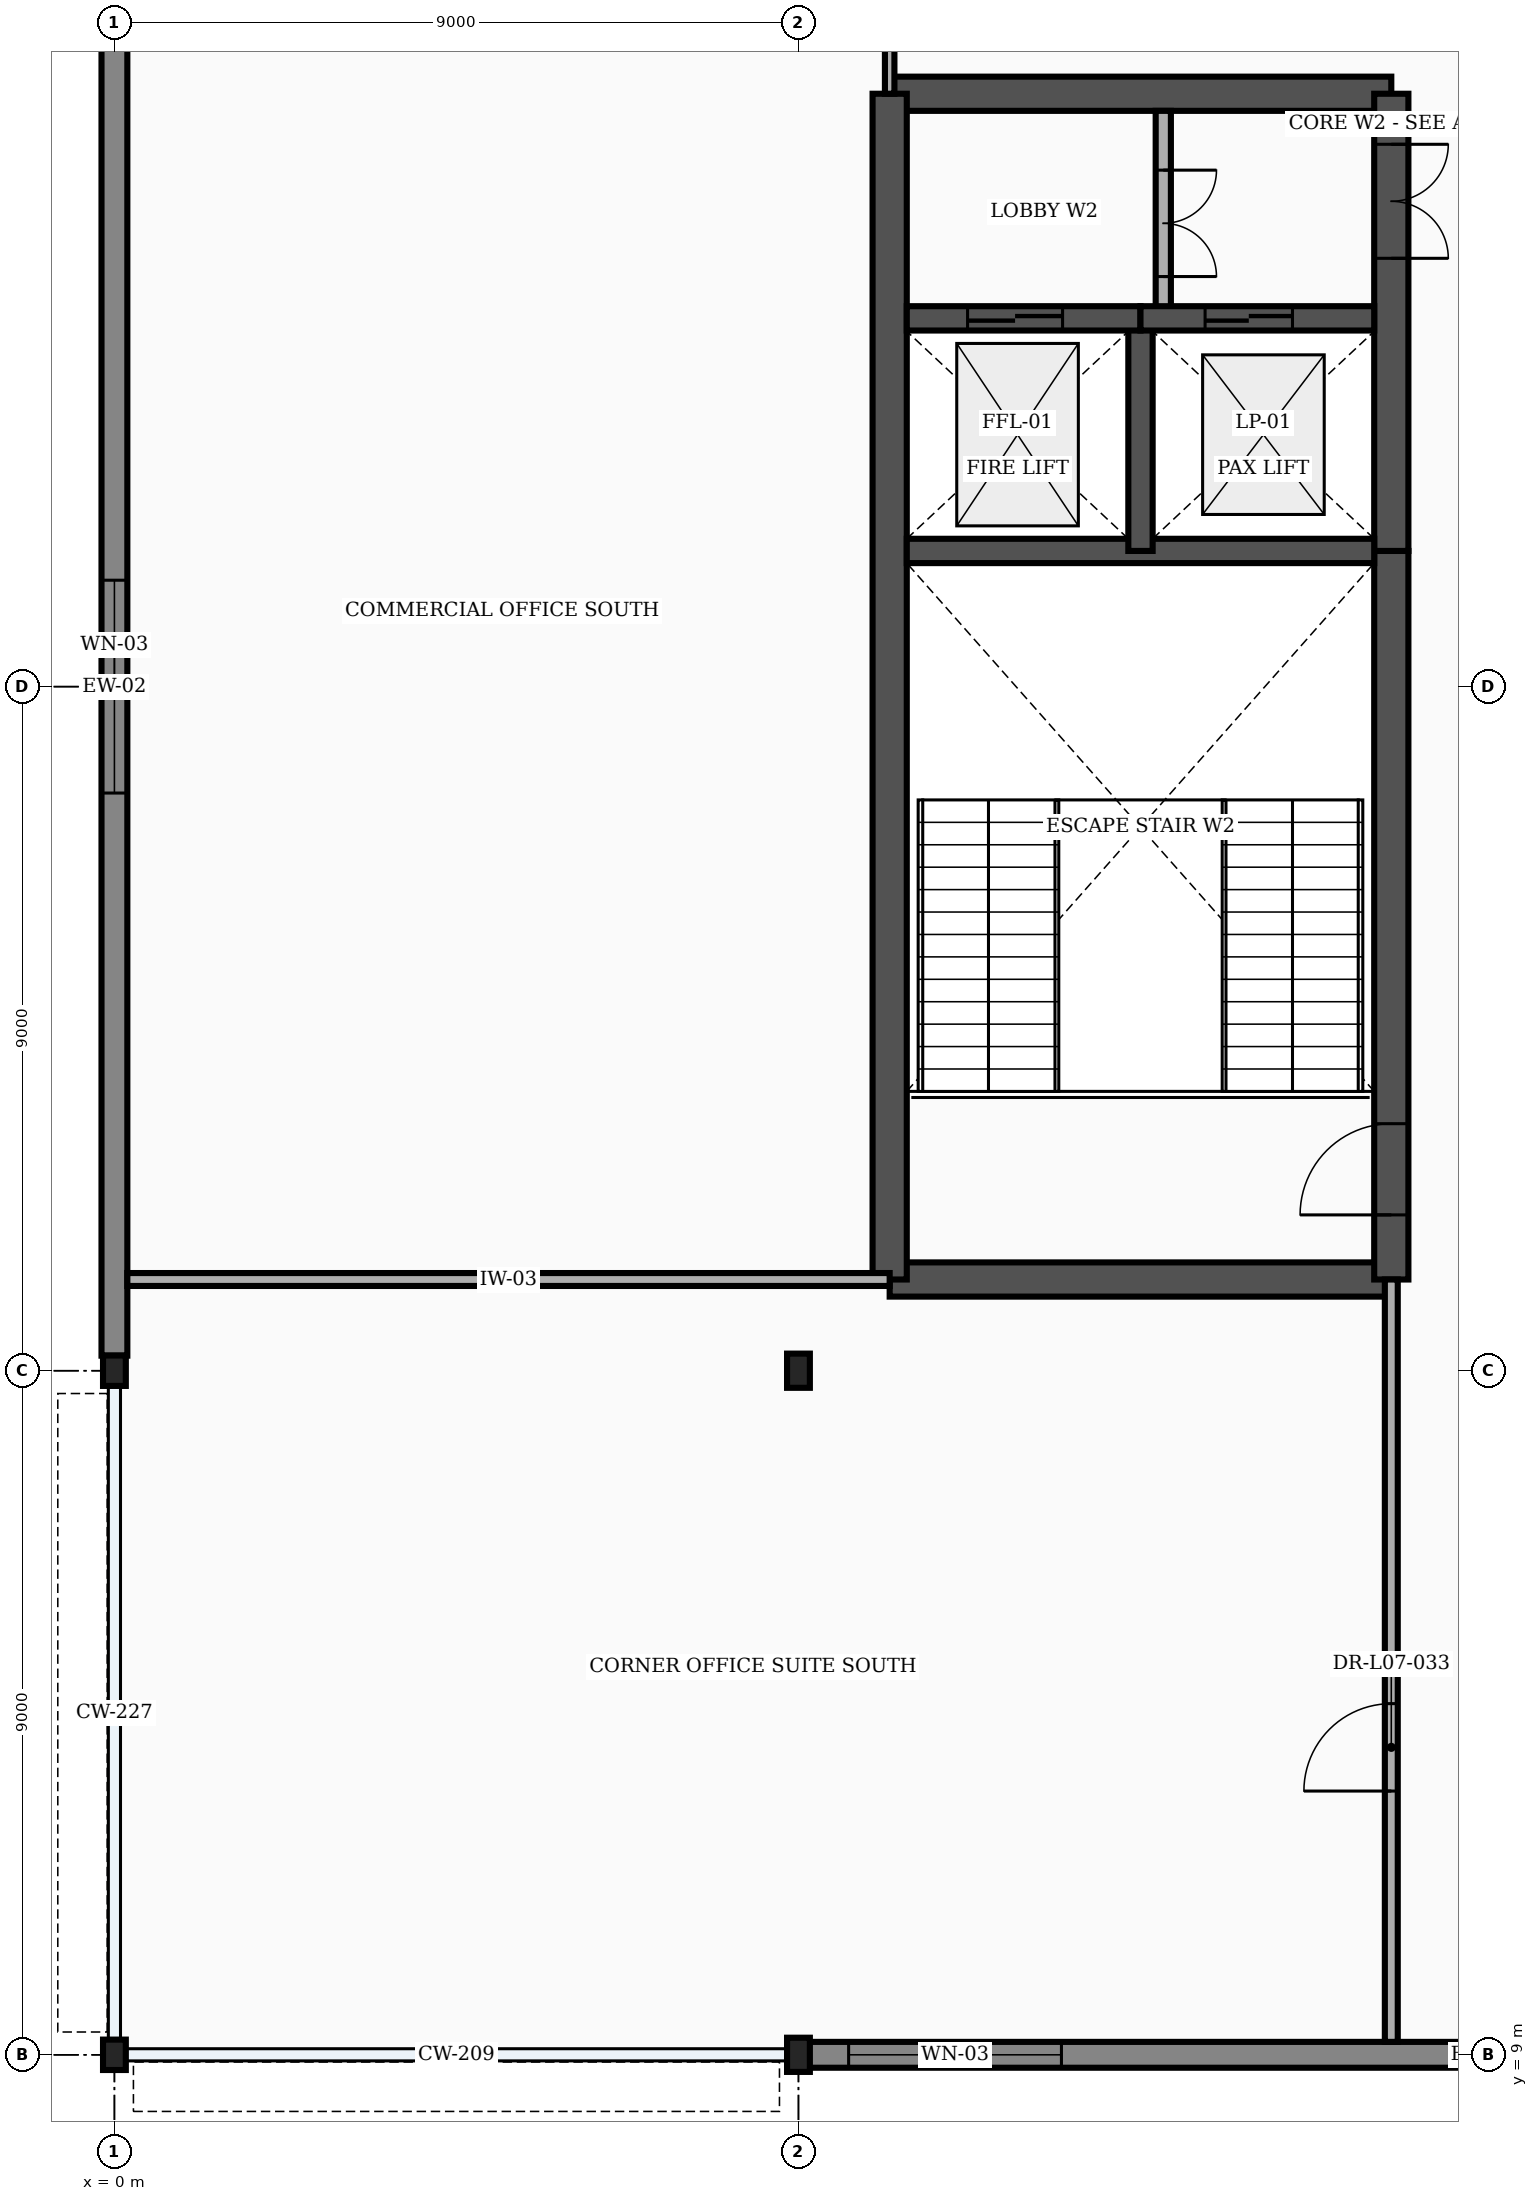
"""IFC4 building model, lengths in metres.
Left out: names, types, materials, properties, quantities, classifications, styles, units other than length and angle.
Written with IfcOpenShell. Run it as: python <this file> out.ifc"""

import sys

from ifc_helpers import new_model, si_unit, direction, frame, frame_2d, origin, origin_2d, place, context, subcontext, project, spatial, rectangle, i_section, extrude, element, fill, save


model = new_model("IFC4")
c1 = context("Model", 3, precision=1e-05, world=origin(), true_north=direction((0.0, 1.0)))
c2 = subcontext(c1, "Body", "Model", "MODEL_VIEW")
j1 = project(units=[si_unit("LENGTHUNIT", "METRE"), si_unit("PLANEANGLEUNIT", "RADIAN")], contexts=[c1])
p1 = place(None, origin())
s1 = spatial("IfcSite", under=j1, at=p1, CompositionType="ELEMENT")
p2 = place(p1, origin())
s2 = spatial("IfcBuilding", under=s1, at=p2, CompositionType="ELEMENT")
p3 = place(p2, frame((0.0, 0.0, 33.3)))
s3 = spatial("IfcBuildingStorey", under=s2, at=p3, CompositionType="ELEMENT", Elevation=33.3)
for number, where, z_axis, x_axis in (
    (1, (0.0, 9.0, 0.0), (0.0, 0.0, 1.0), (1.0, 0.0, 0.0)),
    (2, (0.0, 18.0, 0.0), (0.0, 0.0, 1.0), (1.0, 0.0, 0.0)),
):
    element("IfcColumn", number, at=place(p3, frame(where, z_axis=z_axis, x_axis=x_axis)), inside=s3, PredefinedType="COLUMN", context=c2, shape_type="SweptSolid", body=[
        extrude(i_section(OverallWidth=0.3, OverallDepth=0.4, WebThickness=0.013, FlangeThickness=0.024, FilletRadius=0.027, at=origin_2d()), origin(), (0.0, 0.0, 1.0), 4.5),
    ])
for number, where, z_axis, x_axis in (
    (3, (9.0, 9.0, 0.0), (0.0, 0.0, 1.0), (1.0, 0.0, 0.0)),
    (4, (9.0, 18.0, 0.0), (0.0, 0.0, 1.0), (1.0, 0.0, 0.0)),
):
    element("IfcColumn", number, at=place(p3, frame(where, z_axis=z_axis, x_axis=x_axis)), inside=s3, PredefinedType="COLUMN", context=c2, shape_type="SweptSolid", body=[
        extrude(i_section(OverallWidth=0.3, OverallDepth=0.45, WebThickness=0.014, FlangeThickness=0.026, FilletRadius=0.027, at=origin_2d()), origin(), (0.0, 0.0, 1.0), 4.5),
    ])
p4 = place(p3, frame((9.01, 9.0, 0.0), z_axis=(0.0, 0.0, 1.0), x_axis=(1.0, 0.0, 0.0)))
e5 = element("IfcWall", 5, at=p4, inside=s3, PredefinedType="STANDARD", context=c2, shape_type="SweptSolid", body=[
    extrude(rectangle(XDim=17.98, YDim=0.34, at=frame_2d((8.99, 0.0))), origin(), (0.0, 0.0, 1.0), 3.493),
])
p5 = place(p4, frame((0.65, 0.0, 0.85)))
e6 = element("IfcOpeningElement", 6, at=p5, cuts=e5, PredefinedType="OPENING", context=c2, shape_type="SweptSolid", body=[
    extrude(rectangle(XDim=2.8, YDim=2.25, at=frame_2d((1.4, 1.125))), frame((0.0, 0.182, 0.0), z_axis=(0.0, -1.0, 0.0), x_axis=(1.0, 0.0, 0.0)), (0.0, 0.0, 1.0), 0.364),
])
p6 = place(p3, frame((0.0, 18.198, 0.0), z_axis=(0.0, 0.0, 1.0), x_axis=(0.0, 1.0, 0.0)))
e7 = element("IfcWall", 7, at=p6, inside=s3, PredefinedType="STANDARD", context=c2, shape_type="SweptSolid", body=[
    extrude(rectangle(XDim=17.604, YDim=0.34, at=frame_2d((8.802, 0.0))), origin(), (0.0, 0.0, 1.0), 3.643),
])
p7 = place(p6, frame((7.402, 0.0, 0.85)))
e8 = element("IfcOpeningElement", 8, at=p7, cuts=e7, PredefinedType="OPENING", context=c2, shape_type="SweptSolid", body=[
    extrude(rectangle(XDim=2.8, YDim=2.25, at=frame_2d((1.4, 1.125))), frame((0.0, 0.182, 0.0), z_axis=(0.0, -1.0, 0.0), x_axis=(1.0, 0.0, 0.0)), (0.0, 0.0, 1.0), 0.364),
])
for number, where, z_axis, x_axis in (
    (9, (10.2, 19.2, 0.0), (0.0, 0.0, 1.0), (1.0, 0.0, 0.0)),
    (10, (10.2, 34.8, 0.0), (0.0, 0.0, 1.0), (1.0, 0.0, 0.0)),
):
    element("IfcWall", number, at=place(p3, frame(where, z_axis=z_axis, x_axis=x_axis)), inside=s3, PredefinedType="SHEAR", context=c2, shape_type="SweptSolid", body=[
        extrude(rectangle(XDim=6.6, YDim=0.45, at=frame_2d((3.3, 0.0))), origin(), (0.0, 0.0, 1.0), 4.255),
    ])
p8 = place(p3, frame((10.2, 19.2, 0.0), z_axis=(0.0, 0.0, 1.0), x_axis=(0.0, 1.0, 0.0)))
e11 = element("IfcWall", 11, at=p8, inside=s3, PredefinedType="SHEAR", context=c2, shape_type="SweptSolid", body=[
    extrude(rectangle(XDim=15.6, YDim=0.45, at=frame_2d((7.8, 0.0))), origin(), (0.0, 0.0, 1.0), 4.255),
])
p9 = place(p3, frame((16.8, 19.2, 0.0), z_axis=(0.0, 0.0, 1.0), x_axis=(0.0, 1.0, 0.0)))
e12 = element("IfcWall", 12, at=p9, inside=s3, PredefinedType="SHEAR", context=c2, shape_type="SweptSolid", body=[
    extrude(rectangle(XDim=9.585, YDim=0.45, at=frame_2d((4.792, 0.0))), origin(), (0.0, 0.0, 1.0), 4.255),
])
p10 = place(p9, frame((0.85, 0.0, 0.0)))
e13 = element("IfcOpeningElement", 13, at=p10, cuts=e12, PredefinedType="OPENING", context=c2, shape_type="SweptSolid", body=[
    extrude(rectangle(XDim=1.2, YDim=2.2, at=frame_2d((0.6, 1.1))), frame((0.0, 0.237, 0.0), z_axis=(0.0, -1.0, 0.0), x_axis=(1.0, 0.0, 0.0)), (0.0, 0.0, 1.0), 0.474),
])
p11 = place(p3, frame((16.8, 28.785, 0.0), z_axis=(0.0, 0.0, 1.0), x_axis=(0.0, 1.0, 0.0)))
e14 = element("IfcWall", 14, at=p11, inside=s3, PredefinedType="SHEAR", context=c2, shape_type="SweptSolid", body=[
    extrude(rectangle(XDim=6.015, YDim=0.45, at=frame_2d((3.008, 0.0))), origin(), (0.0, 0.0, 1.0), 4.255),
])
p12 = place(p11, frame((3.85, 0.0, 0.0)))
e15 = element("IfcOpeningElement", 15, at=p12, cuts=e14, PredefinedType="OPENING", context=c2, shape_type="SweptSolid", body=[
    extrude(rectangle(XDim=1.5, YDim=2.2, at=frame_2d((0.75, 1.1))), frame((0.0, 0.237, 0.0), z_axis=(0.0, -1.0, 0.0), x_axis=(1.0, 0.0, 0.0)), (0.0, 0.0, 1.0), 0.474),
])
p13 = place(p3, frame((10.425, 28.785, 0.0), z_axis=(0.0, 0.0, 1.0), x_axis=(1.0, 0.0, 0.0)))
e16 = element("IfcWall", 16, at=p13, inside=s3, PredefinedType="SHEAR", context=c2, shape_type="SweptSolid", body=[
    extrude(rectangle(XDim=6.15, YDim=0.32, at=frame_2d((3.075, 0.0))), origin(), (0.0, 0.0, 1.0), 4.255),
])
p14 = place(p3, frame((13.5, 28.785, 0.0), z_axis=(0.0, 0.0, 1.0), x_axis=(0.0, 1.0, 0.0)))
e17 = element("IfcWall", 17, at=p14, inside=s3, PredefinedType="SHEAR", context=c2, shape_type="SweptSolid", body=[
    extrude(rectangle(XDim=3.06, YDim=0.32, at=frame_2d((1.53, 0.0))), origin(), (0.0, 0.0, 1.0), 4.255),
])
p15 = place(p3, frame((13.8, 31.845, 0.0), z_axis=(0.0, 0.0, 1.0), x_axis=(0.0, 1.0, 0.0)))
e18 = element("IfcWall", 18, at=p15, inside=s3, PredefinedType="PARTITIONING", context=c2, shape_type="SweptSolid", body=[
    extrude(rectangle(XDim=2.73, YDim=0.2, at=frame_2d((1.365, 0.0))), origin(), (0.0, 0.0, 1.0), 4.255),
])
p16 = place(p15, frame((0.55, 0.0, 0.0)))
e19 = element("IfcOpeningElement", 19, at=p16, cuts=e18, PredefinedType="OPENING", context=c2, shape_type="SweptSolid", body=[
    extrude(rectangle(XDim=1.4, YDim=2.25, at=frame_2d((0.7, 1.125))), frame((0.0, 0.112, 0.0), z_axis=(0.0, -1.0, 0.0), x_axis=(1.0, 0.0, 0.0)), (0.0, 0.0, 1.0), 0.224),
])
p17 = place(p3, frame((10.425, 31.845, 0.0), z_axis=(0.0, 0.0, 1.0), x_axis=(1.0, 0.0, 0.0)))
e20 = element("IfcWall", 20, at=p17, inside=s3, PredefinedType="SHEAR", context=c2, shape_type="SweptSolid", body=[
    extrude(rectangle(XDim=3.075, YDim=0.32, at=frame_2d((1.538, 0.0))), origin(), (0.0, 0.0, 1.0), 4.255),
])
p18 = place(p17, frame((0.8, 0.0, 0.0)))
e21 = element("IfcOpeningElement", 21, at=p18, cuts=e20, PredefinedType="OPENING", context=c2, shape_type="SweptSolid", body=[
    extrude(rectangle(XDim=1.25, YDim=2.25, at=frame_2d((0.625, 1.125))), frame((0.0, 0.172, 0.0), z_axis=(0.0, -1.0, 0.0), x_axis=(1.0, 0.0, 0.0)), (0.0, 0.0, 1.0), 0.344),
])
p19 = place(p3, frame((13.5, 31.845, 0.0), z_axis=(0.0, 0.0, 1.0), x_axis=(1.0, 0.0, 0.0)))
e22 = element("IfcWall", 22, at=p19, inside=s3, PredefinedType="SHEAR", context=c2, shape_type="SweptSolid", body=[
    extrude(rectangle(XDim=3.075, YDim=0.32, at=frame_2d((1.538, 0.0))), origin(), (0.0, 0.0, 1.0), 4.255),
])
p20 = place(p19, frame((0.85, 0.0, 0.0)))
e23 = element("IfcOpeningElement", 23, at=p20, cuts=e22, PredefinedType="OPENING", context=c2, shape_type="SweptSolid", body=[
    extrude(rectangle(XDim=1.15, YDim=2.2, at=frame_2d((0.575, 1.1))), frame((0.0, 0.172, 0.0), z_axis=(0.0, -1.0, 0.0), x_axis=(1.0, 0.0, 0.0)), (0.0, 0.0, 1.0), 0.344),
])
p21 = place(p3, frame((10.2, 34.8, 0.0), z_axis=(0.0, 0.0, 1.0), x_axis=(0.0, 1.0, 0.0)))
e24 = element("IfcWall", 24, at=p21, inside=s3, PredefinedType="PARTITIONING", context=c2, shape_type="SweptSolid", body=[
    extrude(rectangle(XDim=2.0, YDim=0.125, at=frame_2d((1.0, 0.0))), origin(), (0.0, 0.0, 1.0), 4.255),
])
p22 = place(p3, frame((0.17, 19.2, 0.0), z_axis=(0.0, 0.0, 1.0), x_axis=(1.0, 0.0, 0.0)))
e25 = element("IfcWall", 25, at=p22, inside=s3, PredefinedType="PARTITIONING", context=c2, shape_type="SweptSolid", body=[
    extrude(rectangle(XDim=10.03, YDim=0.17, at=frame_2d((5.015, 0.0))), origin(), (0.0, 0.0, 1.0), 4.255),
])
p23 = place(p3, frame((16.8, 9.17, 0.0), z_axis=(0.0, 0.0, 1.0), x_axis=(0.0, 1.0, 0.0)))
e26 = element("IfcWall", 26, at=p23, inside=s3, PredefinedType="PARTITIONING", context=c2, shape_type="SweptSolid", body=[
    extrude(rectangle(XDim=10.03, YDim=0.17, at=frame_2d((5.015, 0.0))), origin(), (0.0, 0.0, 1.0), 4.255),
])
p24 = place(p23, frame((3.3, 0.0, 0.0)))
e27 = element("IfcOpeningElement", 27, at=p24, cuts=e26, PredefinedType="OPENING", context=c2, shape_type="SweptSolid", body=[
    extrude(rectangle(XDim=1.15, YDim=2.15, at=frame_2d((0.575, 1.075))), frame((0.0, 0.097, 0.0), z_axis=(0.0, -1.0, 0.0), x_axis=(1.0, 0.0, 0.0)), (0.0, 0.0, 1.0), 0.194),
])
p25 = place(p5, origin())
e28 = element("IfcWindow", 28, at=p25, inside=s3, PartitioningType="SINGLE_PANEL", PredefinedType="WINDOW", context=c2, shape_type="SweptSolid", body=[
    extrude(rectangle(XDim=2.8, YDim=2.25, at=frame_2d((1.4, 1.125))), frame((0.0, 0.03, 0.0), z_axis=(0.0, -1.0, 0.0), x_axis=(1.0, 0.0, 0.0)), (0.0, 0.0, 1.0), 0.06),
])
fill(e6, e28)
p26 = place(p7, origin())
e29 = element("IfcWindow", 29, at=p26, inside=s3, PartitioningType="SINGLE_PANEL", PredefinedType="WINDOW", context=c2, shape_type="SweptSolid", body=[
    extrude(rectangle(XDim=2.8, YDim=2.25, at=frame_2d((1.4, 1.125))), frame((0.0, 0.03, 0.0), z_axis=(0.0, -1.0, 0.0), x_axis=(1.0, 0.0, 0.0)), (0.0, 0.0, 1.0), 0.06),
])
fill(e8, e29)
p27 = place(p10, origin())
e30 = element("IfcDoor", 30, at=p27, inside=s3, OperationType="SINGLE_SWING_LEFT", PredefinedType="DOOR", context=c2, shape_type="SweptSolid", body=[
    extrude(rectangle(XDim=1.2, YDim=2.2, at=frame_2d((0.6, 1.1))), frame((0.0, 0.025, 0.0), z_axis=(0.0, -1.0, 0.0), x_axis=(1.0, 0.0, 0.0)), (0.0, 0.0, 1.0), 0.05),
])
fill(e13, e30)
p28 = place(p12, frame((1.5, 0.0, 0.0), z_axis=(0.0, 0.0, 1.0), x_axis=(-1.0, 0.0, 0.0)))
e31 = element("IfcDoor", 31, at=p28, inside=s3, OperationType="DOUBLE_DOOR_SINGLE_SWING", PredefinedType="DOOR", context=c2, shape_type="SweptSolid", body=[
    extrude(rectangle(XDim=1.5, YDim=2.2, at=frame_2d((0.75, 1.1))), frame((0.0, 0.025, 0.0), z_axis=(0.0, -1.0, 0.0), x_axis=(1.0, 0.0, 0.0)), (0.0, 0.0, 1.0), 0.05),
])
fill(e15, e31)
p29 = place(p16, frame((1.4, 0.0, 0.0), z_axis=(0.0, 0.0, 1.0), x_axis=(-1.0, 0.0, 0.0)))
e32 = element("IfcDoor", 32, at=p29, inside=s3, OperationType="DOUBLE_DOOR_SINGLE_SWING", PredefinedType="DOOR", context=c2, shape_type="SweptSolid", body=[
    extrude(rectangle(XDim=1.4, YDim=2.25, at=frame_2d((0.7, 1.125))), frame((0.0, 0.025, 0.0), z_axis=(0.0, -1.0, 0.0), x_axis=(1.0, 0.0, 0.0)), (0.0, 0.0, 1.0), 0.05),
])
fill(e19, e32)
p30 = place(p18, origin())
e33 = element("IfcDoor", 33, at=p30, inside=s3, OperationType="DOUBLE_DOOR_SLIDING", PredefinedType="DOOR", context=c2, shape_type="SweptSolid", body=[
    extrude(rectangle(XDim=1.25, YDim=2.25, at=frame_2d((0.625, 1.125))), frame((0.0, 0.025, 0.0), z_axis=(0.0, -1.0, 0.0), x_axis=(1.0, 0.0, 0.0)), (0.0, 0.0, 1.0), 0.05),
])
fill(e21, e33)
p31 = place(p20, origin())
e34 = element("IfcDoor", 34, at=p31, inside=s3, OperationType="DOUBLE_DOOR_SLIDING", PredefinedType="DOOR", context=c2, shape_type="SweptSolid", body=[
    extrude(rectangle(XDim=1.15, YDim=2.2, at=frame_2d((0.575, 1.1))), frame((0.0, 0.025, 0.0), z_axis=(0.0, -1.0, 0.0), x_axis=(1.0, 0.0, 0.0)), (0.0, 0.0, 1.0), 0.05),
])
fill(e23, e34)
p32 = place(p24, origin())
e35 = element("IfcDoor", 35, at=p32, inside=s3, OperationType="SINGLE_SWING_LEFT", PredefinedType="DOOR", context=c2, shape_type="SweptSolid", body=[
    extrude(rectangle(XDim=1.15, YDim=2.15, at=frame_2d((0.575, 1.075))), frame((0.0, 0.025, 0.0), z_axis=(0.0, -1.0, 0.0), x_axis=(1.0, 0.0, 0.0)), (0.0, 0.0, 1.0), 0.05),
])
fill(e27, e35)
save(model, sys.argv[1])
